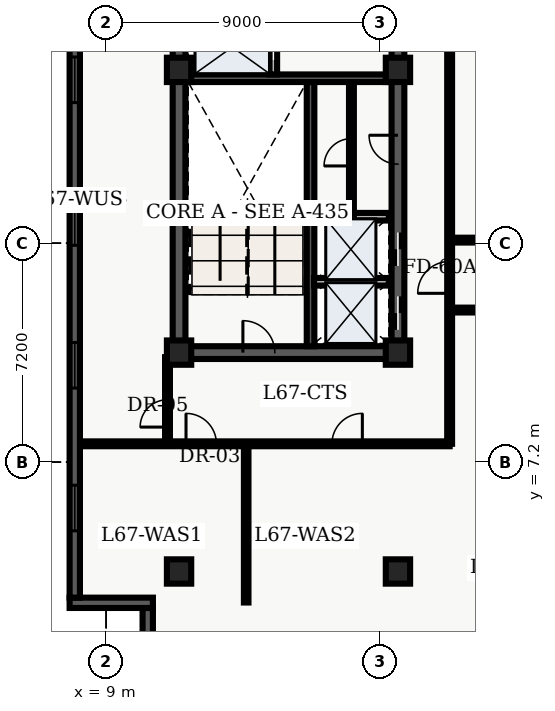
"""IFC4 building model, lengths in metres.
Left out: names, types, materials, properties, quantities, classifications, styles, units other than length and angle.
Written with IfcOpenShell. Run it as: python <this file> out.ifc"""

import sys

from ifc_helpers import new_model, entity, si_unit, converted_unit, direction, frame, origin_with_axes, origin_2d_with_axis, place, context, subcontext, project, spatial, polyline, rectangle, outline, extrude, element, fill, save


model = new_model("IFC4")
c1 = context("Model", 3, precision=1e-05, world=origin_with_axes(), true_north=direction((0.0, 1.0)))
c2 = subcontext(c1, "Body", "Model", "MODEL_VIEW")
j1 = project(units=[si_unit("LENGTHUNIT", "METRE"), converted_unit("PLANEANGLEUNIT", "DEGREE", entity("IfcPlaneAngleMeasure", 0.017), si_unit("PLANEANGLEUNIT", "RADIAN"), dimensions=[0, 0, 0, 0, 0, 0, 0])], contexts=[c1])
p1 = place(None, origin_with_axes())
s1 = spatial("IfcSite", under=j1, at=p1, CompositionType="ELEMENT")
p2 = place(p1, origin_with_axes())
s2 = spatial("IfcBuilding", under=s1, at=p2, CompositionType="ELEMENT")
p3 = place(p2, frame((0.0, 0.0, 272.4), z_axis=(0.0, 0.0, 1.0), x_axis=(1.0, 0.0, 0.0)))
s3 = spatial("IfcBuildingStorey", under=s2, at=p3, CompositionType="ELEMENT", Elevation=272.4)
p4 = place(p3, frame((11.4, 10.8, 0.0), z_axis=(0.0, 0.0, 1.0), x_axis=(0.0, 1.0, 0.0)))
e1 = element("IfcWall", 1, at=p4, inside=s3, PredefinedType="SHEAR", context=c2, shape_type="SweptSolid", body=[
    extrude(outline(polyline([(0.0, -0.21), (27.0, -0.21), (27.0, 0.21), (0.0, 0.21), (0.0, -0.21)])), origin_with_axes(), (0.0, 0.0, 1.0), 3.66),
])
p5 = place(p3, frame((11.4, 10.8, 0.0), z_axis=(0.0, 0.0, 1.0), x_axis=(1.0, 0.0, 0.0)))
e2 = element("IfcWall", 2, at=p5, inside=s3, PredefinedType="SHEAR", context=c2, shape_type="SweptSolid", body=[
    extrude(outline(polyline([(0.0, -0.21), (7.2, -0.21), (7.2, 0.21), (0.0, 0.21), (0.0, -0.21)])), origin_with_axes(), (0.0, 0.0, 1.0), 3.66),
])
p6 = place(p5, frame((2.625, 0.0, 0.0), z_axis=(0.0, 0.0, 1.0), x_axis=(1.0, 0.0, 0.0)))
e3 = element("IfcOpeningElement", 3, at=p6, cuts=e2, PredefinedType="OPENING", context=c2, shape_type="SweptSolid", body=[
    extrude(rectangle(XDim=1.05, YDim=0.44, at=origin_2d_with_axis()), origin_with_axes(), (0.0, 0.0, 1.0), 2.15),
])
p7 = place(p3, frame((18.6, 10.8, 0.0), z_axis=(0.0, 0.0, 1.0), x_axis=(0.0, 1.0, 0.0)))
e4 = element("IfcWall", 4, at=p7, inside=s3, PredefinedType="SHEAR", context=c2, shape_type="SweptSolid", body=[
    extrude(outline(polyline([(0.0, -0.21), (13.5, -0.21), (13.5, 0.21), (0.0, 0.21), (0.0, -0.21)])), origin_with_axes(), (0.0, 0.0, 1.0), 3.66),
])
p8 = place(p7, frame((1.3, 0.0, 0.0), z_axis=(0.0, 0.0, 1.0), x_axis=(1.0, 0.0, 0.0)))
e5 = element("IfcOpeningElement", 5, at=p8, cuts=e4, PredefinedType="OPENING", context=c2, shape_type="SweptSolid", body=[
    extrude(rectangle(XDim=1.1, YDim=0.44, at=origin_2d_with_axis()), origin_with_axes(), (0.0, 0.0, 1.0), 2.15),
])
p9 = place(p7, frame((3.4, 0.0, 0.0), z_axis=(0.0, 0.0, 1.0), x_axis=(1.0, 0.0, 0.0)))
e6 = element("IfcOpeningElement", 6, at=p9, cuts=e4, PredefinedType="OPENING", context=c2, shape_type="SweptSolid", body=[
    extrude(rectangle(XDim=1.1, YDim=0.44, at=origin_2d_with_axis()), origin_with_axes(), (0.0, 0.0, 1.0), 2.15),
])
p10 = place(p7, frame((11.125, 0.0, 0.0), z_axis=(0.0, 0.0, 1.0), x_axis=(1.0, 0.0, 0.0)))
e7 = element("IfcOpeningElement", 7, at=p10, cuts=e4, PredefinedType="OPENING", context=c2, shape_type="SweptSolid", body=[
    extrude(rectangle(XDim=1.05, YDim=0.44, at=origin_2d_with_axis()), origin_with_axes(), (0.0, 0.0, 1.0), 2.15),
])
p11 = place(p7, frame((6.675, 0.0, 0.0), z_axis=(0.0, 0.0, 1.0), x_axis=(1.0, 0.0, 0.0)))
e8 = element("IfcOpeningElement", 8, at=p11, cuts=e4, PredefinedType="OPENING", context=c2, shape_type="SweptSolid", body=[
    extrude(rectangle(XDim=0.95, YDim=0.44, at=origin_2d_with_axis()), origin_with_axes(), (0.0, 0.0, 1.0), 2.15),
])
p12 = place(p3, frame((15.725, 11.01, 0.0), z_axis=(0.0, 0.0, 1.0), x_axis=(0.0, 1.0, 0.0)))
e9 = element("IfcWall", 9, at=p12, inside=s3, PredefinedType="SHEAR", context=c2, shape_type="SweptSolid", body=[
    extrude(outline(polyline([(0.0, -0.125), (8.69, -0.125), (8.69, 0.125), (0.0, 0.125), (0.0, -0.125)])), origin_with_axes(), (0.0, 0.0, 1.0), 3.66),
])
p13 = place(p3, frame((11.61, 19.825, 0.0), z_axis=(0.0, 0.0, 1.0), x_axis=(1.0, 0.0, 0.0)))
e10 = element("IfcWall", 10, at=p13, inside=s3, PredefinedType="SHEAR", context=c2, shape_type="SweptSolid", body=[
    extrude(outline(polyline([(0.0, -0.125), (6.78, -0.125), (6.78, 0.125), (0.0, 0.125), (0.0, -0.125)])), origin_with_axes(), (0.0, 0.0, 1.0), 3.66),
])
p14 = place(p3, frame((14.5, 19.95, 0.0), z_axis=(0.0, 0.0, 1.0), x_axis=(0.0, 1.0, 0.0)))
e11 = element("IfcWall", 11, at=p14, inside=s3, PredefinedType="SOLIDWALL", context=c2, shape_type="SweptSolid", body=[
    extrude(outline(polyline([(0.0, -0.125), (6.25, -0.125), (6.25, 0.125), (0.0, 0.125), (0.0, -0.125)])), origin_with_axes(), (0.0, 0.0, 1.0), 2.7),
])
p15 = place(p14, frame((1.025, 0.0, 0.0), z_axis=(0.0, 0.0, 1.0), x_axis=(1.0, 0.0, 0.0)))
e12 = element("IfcOpeningElement", 12, at=p15, cuts=e11, PredefinedType="OPENING", context=c2, shape_type="SweptSolid", body=[
    extrude(rectangle(XDim=1.1, YDim=0.27, at=origin_2d_with_axis()), origin_with_axes(), (0.0, 0.0, 1.0), 2.15),
])
p16 = place(p14, frame((2.975, 0.0, 0.0), z_axis=(0.0, 0.0, 1.0), x_axis=(1.0, 0.0, 0.0)))
e13 = element("IfcOpeningElement", 13, at=p16, cuts=e11, PredefinedType="OPENING", context=c2, shape_type="SweptSolid", body=[
    extrude(rectangle(XDim=1.1, YDim=0.27, at=origin_2d_with_axis()), origin_with_axes(), (0.0, 0.0, 1.0), 2.15),
])
p17 = place(p14, frame((5.425, 0.0, 0.0), z_axis=(0.0, 0.0, 1.0), x_axis=(1.0, 0.0, 0.0)))
e14 = element("IfcOpeningElement", 14, at=p17, cuts=e11, PredefinedType="OPENING", context=c2, shape_type="SweptSolid", body=[
    extrude(rectangle(XDim=1.2, YDim=0.27, at=origin_2d_with_axis()), origin_with_axes(), (0.0, 0.0, 1.0), 2.15),
])
for number, where, z_axis, x_axis in (
    (15, (11.4, 3.6, 0.0), (0.0, 0.0, 1.0), (1.0, 0.0, 0.0)),
    (16, (11.4, 10.8, 0.0), (0.0, 0.0, 1.0), (1.0, 0.0, 0.0)),
    (17, (11.4, 20.1, 0.0), (0.0, 0.0, 1.0), (1.0, 0.0, 0.0)),
    (18, (18.6, 3.6, 0.0), (0.0, 0.0, 1.0), (1.0, 0.0, 0.0)),
    (19, (18.6, 10.8, 0.0), (0.0, 0.0, 1.0), (1.0, 0.0, 0.0)),
    (20, (18.6, 20.1, 0.0), (0.0, 0.0, 1.0), (1.0, 0.0, 0.0)),
):
    element("IfcColumn", number, at=place(p3, frame(where, z_axis=z_axis, x_axis=x_axis)), inside=s3, PredefinedType="COLUMN", context=c2, shape_type="SweptSolid", body=[
        extrude(rectangle(XDim=0.8, YDim=0.8, at=origin_2d_with_axis()), origin_with_axes(), (0.0, 0.0, 1.0), 3.9),
    ])
for number, where, z_axis, x_axis in (
    (21, (15.84, 13.13, 0.0), (0.0, 0.0, 1.0), (1.0, 0.0, 0.0)),
    (22, (15.84, 15.27, 0.0), (0.0, 0.0, 1.0), (1.0, 0.0, 0.0)),
):
    element("IfcWall", number, at=place(p3, frame(where, z_axis=z_axis, x_axis=x_axis)), inside=s3, PredefinedType="SOLIDWALL", context=c2, shape_type="SweptSolid", body=[
        extrude(outline(polyline([(0.0, -0.125), (2.46, -0.125), (2.46, 0.125), (0.0, 0.125), (0.0, -0.125)])), origin_with_axes(), (0.0, 0.0, 1.0), 2.7),
    ])
p18 = place(p3, frame((17.07, 15.34, 0.0), z_axis=(0.0, 0.0, 1.0), x_axis=(0.0, 1.0, 0.0)))
e23 = element("IfcWall", 23, at=p18, inside=s3, PredefinedType="PARTITIONING", context=c2, shape_type="SweptSolid", body=[
    extrude(outline(polyline([(0.0, -0.08), (4.36, -0.08), (4.36, 0.08), (0.0, 0.08), (0.0, -0.08)])), origin_with_axes(), (0.0, 0.0, 1.0), 2.7),
])
p19 = place(p18, frame((2.05, 0.0, 0.0), z_axis=(0.0, 0.0, 1.0), x_axis=(1.0, 0.0, 0.0)))
e24 = element("IfcOpeningElement", 24, at=p19, cuts=e23, PredefinedType="OPENING", context=c2, shape_type="SweptSolid", body=[
    extrude(rectangle(XDim=0.9, YDim=0.18, at=origin_2d_with_axis()), origin_with_axes(), (0.0, 0.0, 1.0), 2.15),
])
p20 = place(p3, frame((8.135, 7.8, 0.0), z_axis=(0.0, 0.0, 1.0), x_axis=(1.0, 0.0, 0.0)))
e25 = element("IfcWall", 25, at=p20, inside=s3, PredefinedType="PARTITIONING", context=c2, shape_type="SweptSolid", body=[
    extrude(outline(polyline([(0.0, -0.08), (12.165, -0.08), (12.165, 0.08), (0.0, 0.08), (0.0, -0.08)])), origin_with_axes(), (0.0, 0.0, 1.0), 2.7),
])
p21 = place(p20, frame((3.994, 0.0, 0.0), z_axis=(0.0, 0.0, 1.0), x_axis=(1.0, 0.0, 0.0)))
e26 = element("IfcOpeningElement", 26, at=p21, cuts=e25, PredefinedType="OPENING", context=c2, shape_type="SweptSolid", body=[
    extrude(rectangle(XDim=1.0, YDim=0.18, at=origin_2d_with_axis()), origin_with_axes(), (0.0, 0.0, 1.0), 2.15),
])
p22 = place(p20, frame((8.794, 0.0, 0.0), z_axis=(0.0, 0.0, 1.0), x_axis=(1.0, 0.0, 0.0)))
e27 = element("IfcOpeningElement", 27, at=p22, cuts=e25, PredefinedType="OPENING", context=c2, shape_type="SweptSolid", body=[
    extrude(rectangle(XDim=1.0, YDim=0.18, at=origin_2d_with_axis()), origin_with_axes(), (0.0, 0.0, 1.0), 2.15),
])
p23 = place(p3, frame((20.3, 7.8, 0.0), z_axis=(0.0, 0.0, 1.0), x_axis=(0.0, 1.0, 0.0)))
e28 = element("IfcWall", 28, at=p23, inside=s3, PredefinedType="PARTITIONING", context=c2, shape_type="SweptSolid", body=[
    extrude(outline(polyline([(0.0, -0.08), (32.7, -0.08), (32.7, 0.08), (0.0, 0.08), (0.0, -0.08)])), origin_with_axes(), (0.0, 0.0, 1.0), 2.7),
])
p24 = place(p23, frame((14.2, 0.0, 0.0), z_axis=(0.0, 0.0, 1.0), x_axis=(1.0, 0.0, 0.0)))
e29 = element("IfcOpeningElement", 29, at=p24, cuts=e28, PredefinedType="OPENING", context=c2, shape_type="SweptSolid", body=[
    extrude(rectangle(XDim=1.0, YDim=0.18, at=origin_2d_with_axis()), origin_with_axes(), (0.0, 0.0, 1.0), 2.15),
])
p25 = place(p23, frame((18.779, 0.0, 0.0), z_axis=(0.0, 0.0, 1.0), x_axis=(1.0, 0.0, 0.0)))
e30 = element("IfcOpeningElement", 30, at=p25, cuts=e28, PredefinedType="OPENING", context=c2, shape_type="SweptSolid", body=[
    extrude(rectangle(XDim=1.0, YDim=0.18, at=origin_2d_with_axis()), origin_with_axes(), (0.0, 0.0, 1.0), 2.15),
])
p26 = place(p23, frame((23.784, 0.0, 0.0), z_axis=(0.0, 0.0, 1.0), x_axis=(1.0, 0.0, 0.0)))
e31 = element("IfcOpeningElement", 31, at=p26, cuts=e28, PredefinedType="OPENING", context=c2, shape_type="SweptSolid", body=[
    extrude(rectangle(XDim=1.0, YDim=0.18, at=origin_2d_with_axis()), origin_with_axes(), (0.0, 0.0, 1.0), 2.15),
])
p27 = place(p23, frame((27.651, 0.0, 0.0), z_axis=(0.0, 0.0, 1.0), x_axis=(1.0, 0.0, 0.0)))
e32 = element("IfcOpeningElement", 32, at=p27, cuts=e28, PredefinedType="OPENING", context=c2, shape_type="SweptSolid", body=[
    extrude(rectangle(XDim=1.0, YDim=0.18, at=origin_2d_with_axis()), origin_with_axes(), (0.0, 0.0, 1.0), 2.15),
])
p28 = place(p23, frame((5.475, 0.0, 0.0), z_axis=(0.0, 0.0, 1.0), x_axis=(1.0, 0.0, 0.0)))
e33 = element("IfcOpeningElement", 33, at=p28, cuts=e28, PredefinedType="OPENING", context=c2, shape_type="SweptSolid", body=[
    extrude(rectangle(XDim=1.05, YDim=0.18, at=origin_2d_with_axis()), origin_with_axes(), (0.0, 0.0, 1.0), 2.15),
])
p29 = place(p3, frame((11.02, 7.8, 0.0), z_axis=(0.0, 0.0, 1.0), x_axis=(0.0, 1.0, 0.0)))
e34 = element("IfcWall", 34, at=p29, inside=s3, PredefinedType="PARTITIONING", context=c2, shape_type="SweptSolid", body=[
    extrude(outline(polyline([(0.0, -0.08), (2.85, -0.08), (2.85, 0.08), (0.0, 0.08), (0.0, -0.08)])), origin_with_axes(), (0.0, 0.0, 1.0), 2.7),
])
p30 = place(p29, frame((1.0, 0.0, 0.0), z_axis=(0.0, 0.0, 1.0), x_axis=(1.0, 0.0, 0.0)))
e35 = element("IfcOpeningElement", 35, at=p30, cuts=e34, PredefinedType="OPENING", context=c2, shape_type="SweptSolid", body=[
    extrude(rectangle(XDim=0.9, YDim=0.18, at=origin_2d_with_axis()), origin_with_axes(), (0.0, 0.0, 1.0), 2.15),
])
p31 = place(p3, frame((13.608, 2.58, 0.0), z_axis=(0.0, 0.0, 1.0), x_axis=(0.0, 1.0, 0.0)))
e36 = element("IfcWall", 36, at=p31, inside=s3, PredefinedType="PARTITIONING", context=c2, shape_type="SweptSolid", body=[
    extrude(outline(polyline([(0.0, -0.075), (5.12, -0.075), (5.12, 0.075), (0.0, 0.075), (0.0, -0.075)])), origin_with_axes(), (0.0, 0.0, 1.0), 2.7),
])
p32 = place(p3, frame((20.3, 12.2, 0.0), z_axis=(0.0, 0.0, 1.0), x_axis=(1.0, 0.0, 0.0)))
e37 = element("IfcWall", 37, at=p32, inside=s3, PredefinedType="PARTITIONING", context=c2, shape_type="SweptSolid", body=[
    extrude(outline(polyline([(0.0, -0.08), (14.85, -0.08), (14.85, 0.08), (0.0, 0.08), (0.0, -0.08)])), origin_with_axes(), (0.0, 0.0, 1.0), 2.7),
])
p33 = place(p32, frame((8.355, 0.0, 0.0), z_axis=(0.0, 0.0, 1.0), x_axis=(1.0, 0.0, 0.0)))
e38 = element("IfcOpeningElement", 38, at=p33, cuts=e37, PredefinedType="OPENING", context=c2, shape_type="SweptSolid", body=[
    extrude(rectangle(XDim=1.0, YDim=0.18, at=origin_2d_with_axis()), origin_with_axes(), (0.0, 0.0, 1.0), 2.15),
])
p34 = place(p3, frame((20.3, 14.5, 0.0), z_axis=(0.0, 0.0, 1.0), x_axis=(1.0, 0.0, 0.0)))
e39 = element("IfcWall", 39, at=p34, inside=s3, PredefinedType="PARTITIONING", context=c2, shape_type="SweptSolid", body=[
    extrude(outline(polyline([(0.0, -0.08), (14.85, -0.08), (14.85, 0.08), (0.0, 0.08), (0.0, -0.08)])), origin_with_axes(), (0.0, 0.0, 1.0), 2.7),
])
p35 = place(p34, frame((1.739, 0.0, 0.0), z_axis=(0.0, 0.0, 1.0), x_axis=(1.0, 0.0, 0.0)))
e40 = element("IfcOpeningElement", 40, at=p35, cuts=e39, PredefinedType="OPENING", context=c2, shape_type="SweptSolid", body=[
    extrude(rectangle(XDim=1.0, YDim=0.18, at=origin_2d_with_axis()), origin_with_axes(), (0.0, 0.0, 1.0), 2.15),
])
p36 = place(p34, frame((5.299, 0.0, 0.0), z_axis=(0.0, 0.0, 1.0), x_axis=(1.0, 0.0, 0.0)))
e41 = element("IfcOpeningElement", 41, at=p36, cuts=e39, PredefinedType="OPENING", context=c2, shape_type="SweptSolid", body=[
    extrude(rectangle(XDim=1.0, YDim=0.18, at=origin_2d_with_axis()), origin_with_axes(), (0.0, 0.0, 1.0), 2.15),
])
p37 = place(p34, frame((8.889, 0.0, 0.0), z_axis=(0.0, 0.0, 1.0), x_axis=(1.0, 0.0, 0.0)))
e42 = element("IfcOpeningElement", 42, at=p37, cuts=e39, PredefinedType="OPENING", context=c2, shape_type="SweptSolid", body=[
    extrude(rectangle(XDim=1.0, YDim=0.18, at=origin_2d_with_axis()), origin_with_axes(), (0.0, 0.0, 1.0), 2.15),
])
p38 = place(p34, frame((12.624, 0.0, 0.0), z_axis=(0.0, 0.0, 1.0), x_axis=(1.0, 0.0, 0.0)))
e43 = element("IfcOpeningElement", 43, at=p38, cuts=e39, PredefinedType="OPENING", context=c2, shape_type="SweptSolid", body=[
    extrude(rectangle(XDim=1.0, YDim=0.18, at=origin_2d_with_axis()), origin_with_axes(), (0.0, 0.0, 1.0), 2.15),
])
p39 = place(p3, frame((10.37, 0.34, 0.0), z_axis=(0.0, 0.0, 1.0), x_axis=(0.0, 1.0, 0.0)))
e44 = element("IfcWall", 44, at=p39, inside=s3, PredefinedType="SOLIDWALL", context=c2, shape_type="SweptSolid", body=[
    extrude(outline(polyline([(0.0, -0.17), (2.06, -0.17), (2.06, 0.17), (0.0, 0.17), (0.0, -0.17)])), origin_with_axes(), (0.0, 0.0, 1.0), 3.66),
])
p40 = place(p3, frame((10.54, 2.57, 0.0), z_axis=(0.0, 0.0, 1.0), x_axis=(-1.0, 0.0, 0.0)))
e45 = element("IfcWall", 45, at=p40, inside=s3, PredefinedType="SOLIDWALL", context=c2, shape_type="SweptSolid", body=[
    extrude(outline(polyline([(0.0, -0.17), (2.74, -0.17), (2.74, 0.17), (0.0, 0.17), (0.0, -0.17)])), origin_with_axes(), (0.0, 0.0, 1.0), 3.66),
])
p41 = place(p3, frame((7.97, 2.74, 0.0), z_axis=(0.0, 0.0, 1.0), x_axis=(0.0, 1.0, 0.0)))
e46 = element("IfcWall", 46, at=p41, inside=s3, PredefinedType="SOLIDWALL", context=c2, shape_type="SweptSolid", body=[
    extrude(outline(polyline([(0.0, -0.17), (43.46, -0.17), (43.46, 0.17), (0.0, 0.17), (0.0, -0.17)])), origin_with_axes(), (0.0, 0.0, 1.0), 3.66),
])
p42 = place(p41, frame((2.948, 0.0, 0.45), z_axis=(0.0, 0.0, 1.0), x_axis=(1.0, 0.0, 0.0)))
e47 = element("IfcOpeningElement", 47, at=p42, cuts=e46, PredefinedType="OPENING", context=c2, shape_type="SweptSolid", body=[
    extrude(rectangle(XDim=1.5, YDim=0.36, at=origin_2d_with_axis()), origin_with_axes(), (0.0, 0.0, 1.0), 2.1),
])
p43 = place(p41, frame((7.643, 0.0, 0.45), z_axis=(0.0, 0.0, 1.0), x_axis=(1.0, 0.0, 0.0)))
e48 = element("IfcOpeningElement", 48, at=p43, cuts=e46, PredefinedType="OPENING", context=c2, shape_type="SweptSolid", body=[
    extrude(rectangle(XDim=1.5, YDim=0.36, at=origin_2d_with_axis()), origin_with_axes(), (0.0, 0.0, 1.0), 2.1),
])
p44 = place(p41, frame((12.339, 0.0, 0.45), z_axis=(0.0, 0.0, 1.0), x_axis=(1.0, 0.0, 0.0)))
e49 = element("IfcOpeningElement", 49, at=p44, cuts=e46, PredefinedType="OPENING", context=c2, shape_type="SweptSolid", body=[
    extrude(rectangle(XDim=1.5, YDim=0.36, at=origin_2d_with_axis()), origin_with_axes(), (0.0, 0.0, 1.0), 2.1),
])
p45 = place(p41, frame((17.034, 0.0, 0.45), z_axis=(0.0, 0.0, 1.0), x_axis=(1.0, 0.0, 0.0)))
e50 = element("IfcOpeningElement", 50, at=p45, cuts=e46, PredefinedType="OPENING", context=c2, shape_type="SweptSolid", body=[
    extrude(rectangle(XDim=1.5, YDim=0.36, at=origin_2d_with_axis()), origin_with_axes(), (0.0, 0.0, 1.0), 2.1),
])
p46 = place(p41, frame((22.58, 0.0, 0.45), z_axis=(0.0, 0.0, 1.0), x_axis=(1.0, 0.0, 0.0)))
e51 = element("IfcOpeningElement", 51, at=p46, cuts=e46, PredefinedType="OPENING", context=c2, shape_type="SweptSolid", body=[
    extrude(rectangle(XDim=1.5, YDim=0.36, at=origin_2d_with_axis()), origin_with_axes(), (0.0, 0.0, 1.0), 2.1),
])
p47 = place(p41, frame((26.426, 0.0, 0.45), z_axis=(0.0, 0.0, 1.0), x_axis=(1.0, 0.0, 0.0)))
e52 = element("IfcOpeningElement", 52, at=p47, cuts=e46, PredefinedType="OPENING", context=c2, shape_type="SweptSolid", body=[
    extrude(rectangle(XDim=1.5, YDim=0.36, at=origin_2d_with_axis()), origin_with_axes(), (0.0, 0.0, 1.0), 2.1),
])
p48 = place(p41, frame((31.121, 0.0, 0.45), z_axis=(0.0, 0.0, 1.0), x_axis=(1.0, 0.0, 0.0)))
e53 = element("IfcOpeningElement", 53, at=p48, cuts=e46, PredefinedType="OPENING", context=c2, shape_type="SweptSolid", body=[
    extrude(rectangle(XDim=1.5, YDim=0.36, at=origin_2d_with_axis()), origin_with_axes(), (0.0, 0.0, 1.0), 2.1),
])
p49 = place(p41, frame((35.817, 0.0, 0.45), z_axis=(0.0, 0.0, 1.0), x_axis=(1.0, 0.0, 0.0)))
e54 = element("IfcOpeningElement", 54, at=p49, cuts=e46, PredefinedType="OPENING", context=c2, shape_type="SweptSolid", body=[
    extrude(rectangle(XDim=1.5, YDim=0.36, at=origin_2d_with_axis()), origin_with_axes(), (0.0, 0.0, 1.0), 2.1),
])
p50 = place(p41, frame((40.512, 0.0, 0.45), z_axis=(0.0, 0.0, 1.0), x_axis=(1.0, 0.0, 0.0)))
e55 = element("IfcOpeningElement", 55, at=p50, cuts=e46, PredefinedType="OPENING", context=c2, shape_type="SweptSolid", body=[
    extrude(rectangle(XDim=1.5, YDim=0.36, at=origin_2d_with_axis()), origin_with_axes(), (0.0, 0.0, 1.0), 2.1),
])
p51 = place(p7, frame((1.3, 0.0, 0.0), z_axis=(0.0, 0.0, 1.0), x_axis=(1.0, 0.0, 0.0)))
e56 = element("IfcDoor", 56, at=p51, inside=s3, OperationType="SLIDING_TO_LEFT", PredefinedType="DOOR", context=c2, shape_type="SweptSolid", body=[
    extrude(rectangle(XDim=1.1, YDim=0.09, at=origin_2d_with_axis()), origin_with_axes(), (0.0, 0.0, 1.0), 2.15),
])
fill(e5, e56)
p52 = place(p7, frame((3.4, 0.0, 0.0), z_axis=(0.0, 0.0, 1.0), x_axis=(1.0, 0.0, 0.0)))
e57 = element("IfcDoor", 57, at=p52, inside=s3, OperationType="SLIDING_TO_RIGHT", PredefinedType="DOOR", context=c2, shape_type="SweptSolid", body=[
    extrude(rectangle(XDim=1.1, YDim=0.09, at=origin_2d_with_axis()), origin_with_axes(), (0.0, 0.0, 1.0), 2.15),
])
fill(e6, e57)
p53 = place(p14, frame((1.025, 0.0, 0.0), z_axis=(0.0, 0.0, 1.0), x_axis=(1.0, 0.0, 0.0)))
e58 = element("IfcDoor", 58, at=p53, inside=s3, OperationType="SLIDING_TO_LEFT", PredefinedType="DOOR", context=c2, shape_type="SweptSolid", body=[
    extrude(rectangle(XDim=1.1, YDim=0.09, at=origin_2d_with_axis()), origin_with_axes(), (0.0, 0.0, 1.0), 2.15),
])
fill(e12, e58)
p54 = place(p5, frame((2.625, 0.0, 0.0), z_axis=(0.0, 0.0, 1.0), x_axis=(1.0, 0.0, 0.0)))
e59 = element("IfcDoor", 59, at=p54, inside=s3, OperationType="SINGLE_SWING_LEFT", PredefinedType="DOOR", context=c2, shape_type="SweptSolid", body=[
    extrude(rectangle(XDim=1.05, YDim=0.09, at=origin_2d_with_axis()), origin_with_axes(), (0.0, 0.0, 1.0), 2.15),
])
fill(e3, e59)
p55 = place(p18, frame((2.05, 0.0, 0.0), z_axis=(0.0, 0.0, 1.0), x_axis=(1.0, 0.0, 0.0)))
e60 = element("IfcDoor", 60, at=p55, inside=s3, OperationType="SINGLE_SWING_LEFT", PredefinedType="DOOR", context=c2, shape_type="SweptSolid", body=[
    extrude(rectangle(XDim=0.9, YDim=0.09, at=origin_2d_with_axis()), origin_with_axes(), (0.0, 0.0, 1.0), 2.15),
])
fill(e24, e60)
p56 = place(p7, frame((6.675, 0.0, 0.0), z_axis=(0.0, 0.0, 1.0), x_axis=(1.0, 0.0, 0.0)))
e61 = element("IfcDoor", 61, at=p56, inside=s3, OperationType="SINGLE_SWING_RIGHT", PredefinedType="DOOR", context=c2, shape_type="SweptSolid", body=[
    extrude(rectangle(XDim=0.95, YDim=0.09, at=origin_2d_with_axis()), origin_with_axes(), (0.0, 0.0, 1.0), 2.15),
])
fill(e8, e61)
p57 = place(p29, frame((1.0, 0.0, 0.0), z_axis=(0.0, 0.0, 1.0), x_axis=(1.0, 0.0, 0.0)))
e62 = element("IfcDoor", 62, at=p57, inside=s3, OperationType="SINGLE_SWING_LEFT", PredefinedType="DOOR", context=c2, shape_type="SweptSolid", body=[
    extrude(rectangle(XDim=0.9, YDim=0.09, at=origin_2d_with_axis()), origin_with_axes(), (0.0, 0.0, 1.0), 2.15),
])
fill(e35, e62)
p58 = place(p20, frame((3.994, 0.0, 0.0), z_axis=(0.0, 0.0, 1.0), x_axis=(1.0, 0.0, 0.0)))
e63 = element("IfcDoor", 63, at=p58, inside=s3, OperationType="SINGLE_SWING_LEFT", PredefinedType="DOOR", context=c2, shape_type="SweptSolid", body=[
    extrude(rectangle(XDim=1.0, YDim=0.09, at=origin_2d_with_axis()), origin_with_axes(), (0.0, 0.0, 1.0), 2.15),
])
fill(e26, e63)
p59 = place(p20, frame((8.794, 0.0, 0.0), z_axis=(0.0, 0.0, 1.0), x_axis=(1.0, 0.0, 0.0)))
e64 = element("IfcDoor", 64, at=p59, inside=s3, OperationType="SINGLE_SWING_RIGHT", PredefinedType="DOOR", context=c2, shape_type="SweptSolid", body=[
    extrude(rectangle(XDim=1.0, YDim=0.09, at=origin_2d_with_axis()), origin_with_axes(), (0.0, 0.0, 1.0), 2.15),
])
fill(e27, e64)
p60 = place(p23, frame((5.475, 0.0, 0.0), z_axis=(0.0, 0.0, 1.0), x_axis=(1.0, 0.0, 0.0)))
e65 = element("IfcDoor", 65, at=p60, inside=s3, OperationType="SINGLE_SWING_LEFT", PredefinedType="DOOR", context=c2, shape_type="SweptSolid", body=[
    extrude(rectangle(XDim=1.05, YDim=0.09, at=origin_2d_with_axis()), origin_with_axes(), (0.0, 0.0, 1.0), 2.15),
])
fill(e33, e65)
p61 = place(p41, frame((2.948, 0.0, 0.45), z_axis=(0.0, 0.0, 1.0), x_axis=(1.0, 0.0, 0.0)))
e66 = element("IfcWindow", 66, at=p61, inside=s3, PredefinedType="WINDOW", context=c2, shape_type="SweptSolid", body=[
    extrude(rectangle(XDim=1.5, YDim=0.09, at=origin_2d_with_axis()), origin_with_axes(), (0.0, 0.0, 1.0), 2.1),
])
fill(e47, e66)
p62 = place(p41, frame((7.643, 0.0, 0.45), z_axis=(0.0, 0.0, 1.0), x_axis=(1.0, 0.0, 0.0)))
e67 = element("IfcWindow", 67, at=p62, inside=s3, PredefinedType="WINDOW", context=c2, shape_type="SweptSolid", body=[
    extrude(rectangle(XDim=1.5, YDim=0.09, at=origin_2d_with_axis()), origin_with_axes(), (0.0, 0.0, 1.0), 2.1),
])
fill(e48, e67)
p63 = place(p41, frame((12.339, 0.0, 0.45), z_axis=(0.0, 0.0, 1.0), x_axis=(1.0, 0.0, 0.0)))
e68 = element("IfcWindow", 68, at=p63, inside=s3, PredefinedType="WINDOW", context=c2, shape_type="SweptSolid", body=[
    extrude(rectangle(XDim=1.5, YDim=0.09, at=origin_2d_with_axis()), origin_with_axes(), (0.0, 0.0, 1.0), 2.1),
])
fill(e49, e68)
p64 = place(p41, frame((17.034, 0.0, 0.45), z_axis=(0.0, 0.0, 1.0), x_axis=(1.0, 0.0, 0.0)))
e69 = element("IfcWindow", 69, at=p64, inside=s3, PredefinedType="WINDOW", context=c2, shape_type="SweptSolid", body=[
    extrude(rectangle(XDim=1.5, YDim=0.09, at=origin_2d_with_axis()), origin_with_axes(), (0.0, 0.0, 1.0), 2.1),
])
fill(e50, e69)
save(model, sys.argv[1])
